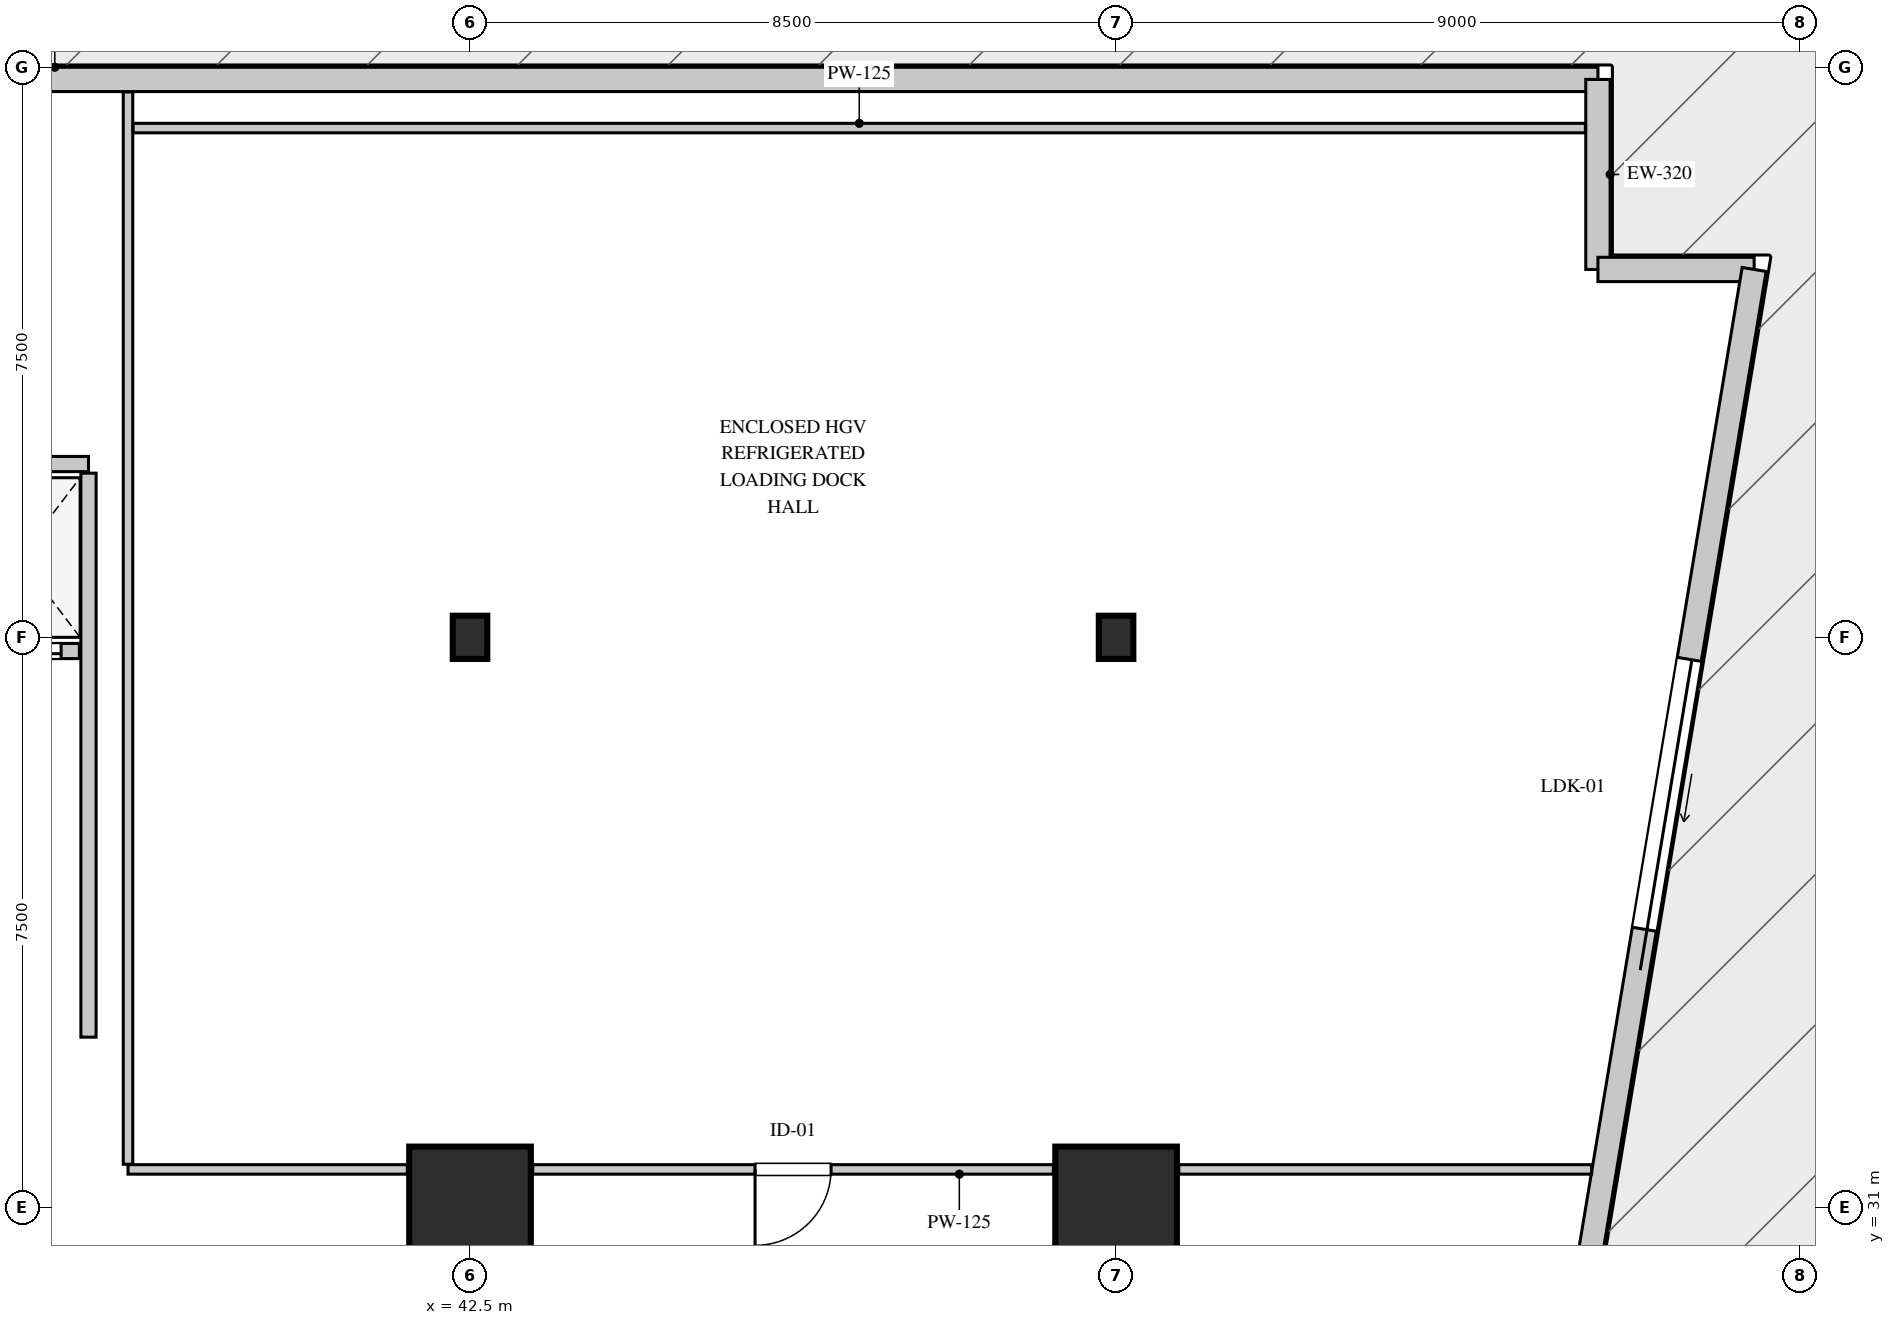
"""IFC4 building model, lengths in metres.
Left out: names, types, materials, properties, quantities, classifications, styles, units other than length and angle.
Written with IfcOpenShell. Run it as: python <this file> out.ifc"""

import sys

from ifc_helpers import new_model, si_unit, direction, frame, frame_2d, origin, origin_2d, place, context, subcontext, project, spatial, rectangle, i_section, extrude, element, fill, save


model = new_model("IFC4")
c1 = context("Model", 3, precision=1e-05, world=origin(), true_north=direction((0.0, 1.0)))
c2 = subcontext(c1, "Body", "Model", "MODEL_VIEW")
j1 = project(units=[si_unit("LENGTHUNIT", "METRE"), si_unit("PLANEANGLEUNIT", "RADIAN")], contexts=[c1])
p1 = place(None, origin())
s1 = spatial("IfcSite", under=j1, at=p1, CompositionType="ELEMENT")
p2 = place(p1, origin())
s2 = spatial("IfcBuilding", under=s1, at=p2, CompositionType="ELEMENT")
p3 = place(p2, origin())
s3 = spatial("IfcBuildingStorey", under=s2, at=p3, CompositionType="ELEMENT", Elevation=0.0)
p4 = place(p3, frame((42.5, 31.0, 0.0), z_axis=(0.0, 0.0, 1.0), x_axis=(1.0, 0.0, 0.0)))
e1 = element("IfcColumn", 1, at=p4, inside=s3, PredefinedType="COLUMN", context=c2, shape_type="SweptSolid", body=[
    extrude(rectangle(XDim=1.6, YDim=1.6, at=origin_2d()), origin(), (0.0, 0.0, 1.0), 5.4),
])
p5 = place(p3, frame((42.5, 38.5, 0.0), z_axis=(0.0, 0.0, 1.0), x_axis=(1.0, 0.0, 0.0)))
e2 = element("IfcColumn", 2, at=p5, inside=s3, PredefinedType="COLUMN", context=c2, shape_type="SweptSolid", body=[
    extrude(i_section(OverallWidth=0.454, OverallDepth=0.569, WebThickness=0.078, FlangeThickness=0.08, FilletRadius=0.015, at=origin_2d()), origin(), (0.0, 0.0, 1.0), 5.4),
])
p6 = place(p3, frame((51.0, 31.0, 0.0), z_axis=(0.0, 0.0, 1.0), x_axis=(1.0, 0.0, 0.0)))
e3 = element("IfcColumn", 3, at=p6, inside=s3, PredefinedType="COLUMN", context=c2, shape_type="SweptSolid", body=[
    extrude(rectangle(XDim=1.6, YDim=1.6, at=origin_2d()), origin(), (0.0, 0.0, 1.0), 5.4),
])
p7 = place(p3, frame((51.0, 38.5, 0.0), z_axis=(0.0, 0.0, 1.0), x_axis=(1.0, 0.0, 0.0)))
e4 = element("IfcColumn", 4, at=p7, inside=s3, PredefinedType="COLUMN", context=c2, shape_type="SweptSolid", body=[
    extrude(i_section(OverallWidth=0.454, OverallDepth=0.569, WebThickness=0.078, FlangeThickness=0.08, FilletRadius=0.015, at=origin_2d()), origin(), (0.0, 0.0, 1.0), 5.4),
])
p8 = place(p3, frame((2.66, 45.84, 0.0), z_axis=(0.0, 0.0, 1.0), x_axis=(1.0, 0.0, 0.0)))
e5 = element("IfcWall", 5, at=p8, inside=s3, PredefinedType="STANDARD", context=c2, shape_type="SweptSolid", body=[
    extrude(rectangle(XDim=54.68, YDim=0.32, at=frame_2d((27.34, 0.0))), origin(), (0.0, 0.0, 1.0), 5.08),
])
p9 = place(p8, frame((12.223, 0.0, 0.0)))
e6 = element("IfcOpeningElement", 6, at=p9, cuts=e5, PredefinedType="OPENING", context=c2, shape_type="SweptSolid", body=[
    extrude(rectangle(XDim=1.8, YDim=2.4, at=frame_2d((0.9, 1.2))), frame((0.0, 0.17, 0.0), z_axis=(0.0, -1.0, 0.0), x_axis=(1.0, 0.0, 0.0)), (0.0, 0.0, 1.0), 0.34),
])
p10 = place(p3, frame((57.34, 45.84, 0.0), z_axis=(0.0, 0.0, 1.0), x_axis=(0.0, -1.0, 0.0)))
e7 = element("IfcWall", 7, at=p10, inside=s3, PredefinedType="STANDARD", context=c2, shape_type="SweptSolid", body=[
    extrude(rectangle(XDim=2.5, YDim=0.32, at=frame_2d((1.25, 0.0))), origin(), (0.0, 0.0, 1.0), 5.08),
])
p11 = place(p3, frame((57.34, 43.34, 0.0), z_axis=(0.0, 0.0, 1.0), x_axis=(1.0, 0.0, 0.0)))
e8 = element("IfcWall", 8, at=p11, inside=s3, PredefinedType="STANDARD", context=c2, shape_type="SweptSolid", body=[
    extrude(rectangle(XDim=2.055, YDim=0.32, at=frame_2d((1.027, 0.0))), origin(), (0.0, 0.0, 1.0), 5.08),
])
p12 = place(p3, frame((59.395, 43.34, 0.0), z_axis=(0.0, 0.0, 1.0), x_axis=(-0.164174341808, -0.986431338458, 0.0)))
e9 = element("IfcWall", 9, at=p12, inside=s3, PredefinedType="STANDARD", context=c2, shape_type="SweptSolid", body=[
    extrude(rectangle(XDim=41.24, YDim=0.32, at=frame_2d((20.62, 0.0))), origin(), (0.0, 0.0, 1.0), 5.08),
])
p13 = place(p12, frame((30.656, 0.0, 0.0)))
e10 = element("IfcOpeningElement", 10, at=p13, cuts=e9, PredefinedType="OPENING", context=c2, shape_type="SweptSolid", body=[
    extrude(rectangle(XDim=6.2, YDim=4.6, at=frame_2d((3.1, 2.3))), frame((0.0, 0.17, 0.0), z_axis=(0.0, -1.0, 0.0), x_axis=(1.0, 0.0, 0.0)), (0.0, 0.0, 1.0), 0.34),
])
p14 = place(p12, frame((5.2, 0.0, 0.0)))
e11 = element("IfcOpeningElement", 11, at=p14, cuts=e9, PredefinedType="OPENING", context=c2, shape_type="SweptSolid", body=[
    extrude(rectangle(XDim=3.6, YDim=4.2, at=frame_2d((1.8, 2.1))), frame((0.0, 0.17, 0.0), z_axis=(0.0, -1.0, 0.0), x_axis=(1.0, 0.0, 0.0)), (0.0, 0.0, 1.0), 0.34),
])
p15 = place(p12, frame((21.93, 0.0, 0.0)))
e12 = element("IfcOpeningElement", 12, at=p15, cuts=e9, PredefinedType="OPENING", context=c2, shape_type="SweptSolid", body=[
    extrude(rectangle(XDim=1.8, YDim=2.4, at=frame_2d((0.9, 1.2))), frame((0.0, 0.17, 0.0), z_axis=(0.0, -1.0, 0.0), x_axis=(1.0, 0.0, 0.0)), (0.0, 0.0, 1.0), 0.34),
])
p16 = place(p3, frame((30.5, 40.78, 0.0), z_axis=(0.0, 0.0, 1.0), x_axis=(1.0, 0.0, 0.0)))
e13 = element("IfcWall", 13, at=p16, inside=s3, PredefinedType="PARTITIONING", context=c2, shape_type="SweptSolid", body=[
    extrude(rectangle(XDim=6.98, YDim=0.2, at=frame_2d((3.49, 0.0))), origin(), (0.0, 0.0, 1.0), 5.08),
])
p17 = place(p3, frame((37.48, 33.24, 0.0), z_axis=(0.0, 0.0, 1.0), x_axis=(0.0, 1.0, 0.0)))
e14 = element("IfcWall", 14, at=p17, inside=s3, PredefinedType="PARTITIONING", context=c2, shape_type="SweptSolid", body=[
    extrude(rectangle(XDim=7.42, YDim=0.2, at=frame_2d((3.71, 0.0))), origin(), (0.0, 0.0, 1.0), 5.08),
])
p18 = place(p3, frame((30.5, 38.32, 0.0), z_axis=(0.0, 0.0, 1.0), x_axis=(1.0, 0.0, 0.0)))
e15 = element("IfcWall", 15, at=p18, inside=s3, PredefinedType="PARTITIONING", context=c2, shape_type="SweptSolid", body=[
    extrude(rectangle(XDim=6.86, YDim=0.2, at=frame_2d((3.43, 0.0))), origin(), (0.0, 0.0, 1.0), 5.08),
])
p19 = place(p18, frame((0.36, 0.0, 0.0)))
e16 = element("IfcOpeningElement", 16, at=p19, cuts=e15, PredefinedType="OPENING", context=c2, shape_type="SweptSolid", body=[
    extrude(rectangle(XDim=1.1, YDim=2.2, at=frame_2d((0.55, 1.1))), frame((0.0, 0.11, 0.0), z_axis=(0.0, -1.0, 0.0), x_axis=(1.0, 0.0, 0.0)), (0.0, 0.0, 1.0), 0.22),
])
p20 = place(p18, frame((2.08, 0.0, 0.0)))
e17 = element("IfcOpeningElement", 17, at=p20, cuts=e15, PredefinedType="OPENING", context=c2, shape_type="SweptSolid", body=[
    extrude(rectangle(XDim=1.1, YDim=2.2, at=frame_2d((0.55, 1.1))), frame((0.0, 0.11, 0.0), z_axis=(0.0, -1.0, 0.0), x_axis=(1.0, 0.0, 0.0)), (0.0, 0.0, 1.0), 0.22),
])
p21 = place(p18, frame((3.8, 0.0, 0.0)))
e18 = element("IfcOpeningElement", 18, at=p21, cuts=e15, PredefinedType="OPENING", context=c2, shape_type="SweptSolid", body=[
    extrude(rectangle(XDim=1.1, YDim=2.2, at=frame_2d((0.55, 1.1))), frame((0.0, 0.11, 0.0), z_axis=(0.0, -1.0, 0.0), x_axis=(1.0, 0.0, 0.0)), (0.0, 0.0, 1.0), 0.22),
])
p22 = place(p18, frame((5.52, 0.0, 0.0)))
e19 = element("IfcOpeningElement", 19, at=p22, cuts=e15, PredefinedType="OPENING", context=c2, shape_type="SweptSolid", body=[
    extrude(rectangle(XDim=1.1, YDim=2.2, at=frame_2d((0.55, 1.1))), frame((0.0, 0.11, 0.0), z_axis=(0.0, -1.0, 0.0), x_axis=(1.0, 0.0, 0.0)), (0.0, 0.0, 1.0), 0.22),
])
p23 = place(p3, frame((50.175, 31.5, 0.0), z_axis=(0.0, 0.0, 1.0), x_axis=(-1.0, 0.0, 0.0)))
e20 = element("IfcWall", 20, at=p23, inside=s3, PredefinedType="PARTITIONING", context=c2, shape_type="SweptSolid", body=[
    extrude(rectangle(XDim=6.85, YDim=0.125, at=frame_2d((3.425, 0.0))), origin(), (0.0, 0.0, 1.0), 5.08),
])
p24 = place(p23, frame((2.925, 0.0, 0.0)))
e21 = element("IfcOpeningElement", 21, at=p24, cuts=e20, PredefinedType="OPENING", context=c2, shape_type="SweptSolid", body=[
    extrude(rectangle(XDim=1.0, YDim=2.15, at=frame_2d((0.5, 1.075))), frame((0.0, 0.073, 0.0), z_axis=(0.0, -1.0, 0.0), x_axis=(1.0, 0.0, 0.0)), (0.0, 0.0, 1.0), 0.145),
])
p25 = place(p3, frame((41.675, 31.5, 0.0), z_axis=(0.0, 0.0, 1.0), x_axis=(-1.0, 0.0, 0.0)))
e22 = element("IfcWall", 22, at=p25, inside=s3, PredefinedType="PARTITIONING", context=c2, shape_type="SweptSolid", body=[
    extrude(rectangle(XDim=3.675, YDim=0.125, at=frame_2d((1.837, 0.0))), origin(), (0.0, 0.0, 1.0), 5.08),
])
p26 = place(p3, frame((38.0, 31.567, 0.0), z_axis=(0.0, 0.0, 1.0), x_axis=(0.0, 1.0, 0.0)))
e23 = element("IfcWall", 23, at=p26, inside=s3, PredefinedType="PARTITIONING", context=c2, shape_type="SweptSolid", body=[
    extrude(rectangle(XDim=14.108, YDim=0.125, at=frame_2d((7.054, 0.0))), origin(), (0.0, 0.0, 1.0), 5.08),
])
p27 = place(p3, frame((38.067, 45.2, 0.0), z_axis=(0.0, 0.0, 1.0), x_axis=(1.0, 0.0, 0.0)))
e24 = element("IfcWall", 24, at=p27, inside=s3, PredefinedType="PARTITIONING", context=c2, shape_type="SweptSolid", body=[
    extrude(rectangle(XDim=19.108, YDim=0.125, at=frame_2d((9.554, 0.0))), origin(), (0.0, 0.0, 1.0), 5.08),
])
p28 = place(p3, frame((57.257, 31.5, 0.0), z_axis=(0.0, 0.0, 1.0), x_axis=(-1.0, 0.0, 0.0)))
e25 = element("IfcWall", 25, at=p28, inside=s3, PredefinedType="PARTITIONING", context=c2, shape_type="SweptSolid", body=[
    extrude(rectangle(XDim=5.432, YDim=0.125, at=frame_2d((2.716, 0.0))), origin(), (0.0, 0.0, 1.0), 5.08),
])
p29 = place(p14, origin())
e26 = element("IfcDoor", 26, at=p29, inside=s3, OperationType="ROLLINGUP", PredefinedType="GATE", context=c2, shape_type="SweptSolid", body=[
    extrude(rectangle(XDim=3.6, YDim=4.2, at=frame_2d((1.8, 2.1))), frame((0.0, 0.025, 0.0), z_axis=(0.0, -1.0, 0.0), x_axis=(1.0, 0.0, 0.0)), (0.0, 0.0, 1.0), 0.05),
])
fill(e11, e26)
p30 = place(p22, origin())
e27 = element("IfcDoor", 27, at=p30, inside=s3, OperationType="DOUBLE_DOOR_SLIDING", PredefinedType="DOOR", context=c2, shape_type="SweptSolid", body=[
    extrude(rectangle(XDim=1.1, YDim=2.2, at=frame_2d((0.55, 1.1))), frame((0.0, 0.025, 0.0), z_axis=(0.0, -1.0, 0.0), x_axis=(1.0, 0.0, 0.0)), (0.0, 0.0, 1.0), 0.05),
])
fill(e19, e27)
p31 = place(p24, origin())
e28 = element("IfcDoor", 28, at=p31, inside=s3, OperationType="SINGLE_SWING_RIGHT", PredefinedType="DOOR", context=c2, shape_type="SweptSolid", body=[
    extrude(rectangle(XDim=1.0, YDim=2.15, at=frame_2d((0.5, 1.075))), frame((0.0, 0.025, 0.0), z_axis=(0.0, -1.0, 0.0), x_axis=(1.0, 0.0, 0.0)), (0.0, 0.0, 1.0), 0.05),
])
fill(e21, e28)
save(model, sys.argv[1])
